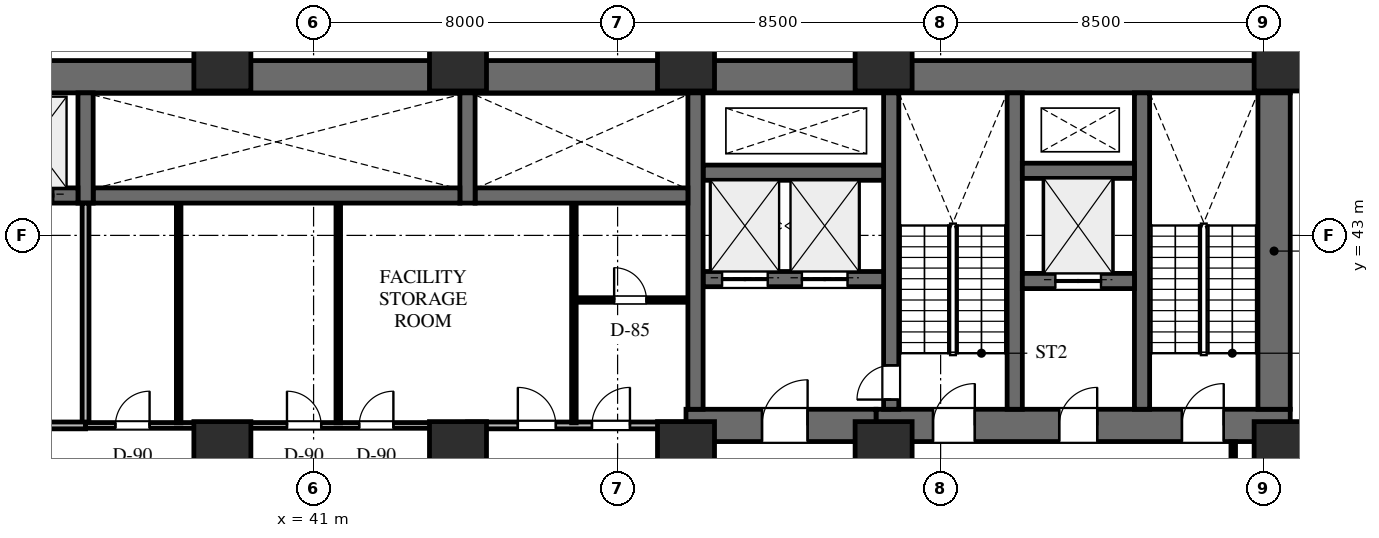
"""IFC4 building model, lengths in metres.
Left out: names, types, materials, properties, quantities, classifications, styles, units other than length and angle.
Written with IfcOpenShell. Run it as: python <this file> out.ifc"""

import sys

from ifc_helpers import new_model, si_unit, direction, frame, frame_2d, origin, origin_2d, place, context, subcontext, project, spatial, rectangle, extrude, element, fill, save


model = new_model("IFC4")
c1 = context("Model", 3, precision=1e-05, world=origin(), true_north=direction((0.0, 1.0)))
c2 = subcontext(c1, "Body", "Model", "MODEL_VIEW")
j1 = project(units=[si_unit("LENGTHUNIT", "METRE"), si_unit("PLANEANGLEUNIT", "RADIAN")], contexts=[c1])
p1 = place(None, origin())
s1 = spatial("IfcSite", under=j1, at=p1, CompositionType="ELEMENT")
p2 = place(p1, origin())
s2 = spatial("IfcBuilding", under=s1, at=p2, CompositionType="ELEMENT")
p3 = place(p2, frame((0.0, 0.0, 19.8)))
s3 = spatial("IfcBuildingStorey", under=s2, at=p3, CompositionType="ELEMENT", Elevation=19.8)
p4 = place(p3, frame((22.9, 47.175, 0.0), z_axis=(0.0, 0.0, 1.0), x_axis=(1.0, 0.0, 0.0)))
e1 = element("IfcWall", 1, at=p4, inside=s3, PredefinedType="SHEAR", context=c2, shape_type="SweptSolid", body=[
    extrude(rectangle(XDim=43.8, YDim=0.85, at=frame_2d((21.9, 0.0))), origin(), (0.0, 0.0, 1.0), 4.5),
])
p5 = place(p3, frame((55.8, 38.0, 0.0), z_axis=(0.0, 0.0, 1.0), x_axis=(1.0, 0.0, 0.0)))
e2 = element("IfcWall", 2, at=p5, inside=s3, PredefinedType="SHEAR", context=c2, shape_type="SweptSolid", body=[
    extrude(rectangle(XDim=10.9, YDim=0.85, at=frame_2d((5.45, 0.0))), origin(), (0.0, 0.0, 1.0), 4.5),
])
p6 = place(p5, frame((1.5, 0.0, 0.0)))
e3 = element("IfcOpeningElement", 3, at=p6, cuts=e2, PredefinedType="OPENING", context=c2, shape_type="SweptSolid", body=[
    extrude(rectangle(XDim=1.1, YDim=2.2, at=frame_2d((0.55, 1.1))), frame((0.0, 0.435, 0.0), z_axis=(0.0, -1.0, 0.0), x_axis=(1.0, 0.0, 0.0)), (0.0, 0.0, 1.0), 0.87),
])
p7 = place(p5, frame((4.82, 0.0, 0.0)))
e4 = element("IfcOpeningElement", 4, at=p7, cuts=e2, PredefinedType="OPENING", context=c2, shape_type="SweptSolid", body=[
    extrude(rectangle(XDim=1.0, YDim=2.15, at=frame_2d((0.5, 1.075))), frame((0.0, 0.435, 0.0), z_axis=(0.0, -1.0, 0.0), x_axis=(1.0, 0.0, 0.0)), (0.0, 0.0, 1.0), 0.87),
])
p8 = place(p5, frame((8.05, 0.0, 0.0)))
e5 = element("IfcOpeningElement", 5, at=p8, cuts=e2, PredefinedType="OPENING", context=c2, shape_type="SweptSolid", body=[
    extrude(rectangle(XDim=1.1, YDim=2.2, at=frame_2d((0.55, 1.1))), frame((0.0, 0.435, 0.0), z_axis=(0.0, -1.0, 0.0), x_axis=(1.0, 0.0, 0.0)), (0.0, 0.0, 1.0), 0.87),
])
p9 = place(p3, frame((66.275, 38.425, 0.0), z_axis=(0.0, 0.0, 1.0), x_axis=(0.0, 1.0, 0.0)))
e6 = element("IfcWall", 6, at=p9, inside=s3, PredefinedType="SHEAR", context=c2, shape_type="SweptSolid", body=[
    extrude(rectangle(XDim=8.325, YDim=0.85, at=frame_2d((4.163, 0.0))), origin(), (0.0, 0.0, 1.0), 4.5),
])
for number, where, z_axis, x_axis in (
    (7, (62.8, 38.425, 0.0), (0.0, 0.0, 1.0), (0.0, 1.0, 0.0)),
    (8, (59.45, 38.425, 0.0), (0.0, 0.0, 1.0), (0.0, 1.0, 0.0)),
):
    element("IfcWall", number, at=place(p3, frame(where, z_axis=z_axis, x_axis=x_axis)), inside=s3, PredefinedType="SHEAR", context=c2, shape_type="SweptSolid", body=[
        extrude(rectangle(XDim=8.325, YDim=0.4, at=frame_2d((4.163, 0.0))), origin(), (0.0, 0.0, 1.0), 4.5),
    ])
p10 = place(p3, frame((56.2, 38.425, 0.0), z_axis=(0.0, 0.0, 1.0), x_axis=(0.0, 1.0, 0.0)))
e9 = element("IfcWall", 9, at=p10, inside=s3, PredefinedType="SHEAR", context=c2, shape_type="SweptSolid", body=[
    extrude(rectangle(XDim=8.325, YDim=0.4, at=frame_2d((4.163, 0.0))), origin(), (0.0, 0.0, 1.0), 4.5),
])
p11 = place(p10, frame((0.255, 0.0, 0.0)))
e10 = element("IfcOpeningElement", 10, at=p11, cuts=e9, PredefinedType="OPENING", context=c2, shape_type="SweptSolid", body=[
    extrude(rectangle(XDim=0.9, YDim=2.15, at=frame_2d((0.45, 1.075))), frame((0.0, 0.21, 0.0), z_axis=(0.0, -1.0, 0.0), x_axis=(1.0, 0.0, 0.0)), (0.0, 0.0, 1.0), 0.42),
])
p12 = place(p3, frame((59.65, 41.8, 0.0), z_axis=(0.0, 0.0, 1.0), x_axis=(1.0, 0.0, 0.0)))
e11 = element("IfcWall", 11, at=p12, inside=s3, PredefinedType="SHEAR", context=c2, shape_type="SweptSolid", body=[
    extrude(rectangle(XDim=2.95, YDim=0.4, at=frame_2d((1.475, 0.0))), origin(), (0.0, 0.0, 1.0), 4.5),
])
p13 = place(p12, frame((0.87, 0.0, 0.0)))
e12 = element("IfcOpeningElement", 12, at=p13, cuts=e11, PredefinedType="OPENING", context=c2, shape_type="SweptSolid", body=[
    extrude(rectangle(XDim=1.2, YDim=2.2, at=frame_2d((0.6, 1.1))), frame((0.0, 0.21, 0.0), z_axis=(0.0, -1.0, 0.0), x_axis=(1.0, 0.0, 0.0)), (0.0, 0.0, 1.0), 0.42),
])
p14 = place(p3, frame((59.65, 44.7, 0.0), z_axis=(0.0, 0.0, 1.0), x_axis=(1.0, 0.0, 0.0)))
e13 = element("IfcWall", 13, at=p14, inside=s3, PredefinedType="SHEAR", context=c2, shape_type="SweptSolid", body=[
    extrude(rectangle(XDim=2.95, YDim=0.4, at=frame_2d((1.475, 0.0))), origin(), (0.0, 0.0, 1.0), 4.5),
])
p15 = place(p3, frame((50.8, 38.0, 0.0), z_axis=(0.0, 0.0, 1.0), x_axis=(1.0, 0.0, 0.0)))
e14 = element("IfcWall", 14, at=p15, inside=s3, PredefinedType="SHEAR", context=c2, shape_type="SweptSolid", body=[
    extrude(rectangle(XDim=5.0, YDim=0.85, at=frame_2d((2.5, 0.0))), origin(), (0.0, 0.0, 1.0), 4.5),
])
p16 = place(p15, frame((2.0, 0.0, 0.0)))
e15 = element("IfcOpeningElement", 15, at=p16, cuts=e14, PredefinedType="OPENING", context=c2, shape_type="SweptSolid", body=[
    extrude(rectangle(XDim=1.2, YDim=2.2, at=frame_2d((0.6, 1.1))), frame((0.0, 0.435, 0.0), z_axis=(0.0, -1.0, 0.0), x_axis=(1.0, 0.0, 0.0)), (0.0, 0.0, 1.0), 0.87),
])
p17 = place(p3, frame((51.25, 41.85, 0.0), z_axis=(0.0, 0.0, 1.0), x_axis=(1.0, 0.0, 0.0)))
e16 = element("IfcWall", 16, at=p17, inside=s3, PredefinedType="SHEAR", context=c2, shape_type="SweptSolid", body=[
    extrude(rectangle(XDim=4.75, YDim=0.4, at=frame_2d((2.375, 0.0))), origin(), (0.0, 0.0, 1.0), 4.5),
])
p18 = place(p17, frame((0.5, 0.0, 0.0)))
e17 = element("IfcOpeningElement", 17, at=p18, cuts=e16, PredefinedType="OPENING", context=c2, shape_type="SweptSolid", body=[
    extrude(rectangle(XDim=1.2, YDim=2.2, at=frame_2d((0.6, 1.1))), frame((0.0, 0.21, 0.0), z_axis=(0.0, -1.0, 0.0), x_axis=(1.0, 0.0, 0.0)), (0.0, 0.0, 1.0), 0.42),
])
p19 = place(p17, frame((2.6, 0.0, 0.0)))
e18 = element("IfcOpeningElement", 18, at=p19, cuts=e16, PredefinedType="OPENING", context=c2, shape_type="SweptSolid", body=[
    extrude(rectangle(XDim=1.2, YDim=2.2, at=frame_2d((0.6, 1.1))), frame((0.0, 0.21, 0.0), z_axis=(0.0, -1.0, 0.0), x_axis=(1.0, 0.0, 0.0)), (0.0, 0.0, 1.0), 0.42),
])
p20 = place(p3, frame((51.25, 44.65, 0.0), z_axis=(0.0, 0.0, 1.0), x_axis=(1.0, 0.0, 0.0)))
e19 = element("IfcWall", 19, at=p20, inside=s3, PredefinedType="SHEAR", context=c2, shape_type="SweptSolid", body=[
    extrude(rectangle(XDim=4.75, YDim=0.4, at=frame_2d((2.375, 0.0))), origin(), (0.0, 0.0, 1.0), 4.5),
])
p21 = place(p3, frame((51.05, 38.425, 0.0), z_axis=(0.0, 0.0, 1.0), x_axis=(0.0, 1.0, 0.0)))
e20 = element("IfcWall", 20, at=p21, inside=s3, PredefinedType="SHEAR", context=c2, shape_type="SweptSolid", body=[
    extrude(rectangle(XDim=8.325, YDim=0.4, at=frame_2d((4.163, 0.0))), origin(), (0.0, 0.0, 1.0), 4.5),
])
p22 = place(p3, frame((45.25, 44.05, 0.0), z_axis=(0.0, 0.0, 1.0), x_axis=(1.0, 0.0, 0.0)))
e21 = element("IfcWall", 21, at=p22, inside=s3, PredefinedType="SHEAR", context=c2, shape_type="SweptSolid", body=[
    extrude(rectangle(XDim=5.6, YDim=0.4, at=frame_2d((2.8, 0.0))), origin(), (0.0, 0.0, 1.0), 4.5),
])
p23 = place(p3, frame((45.05, 43.85, 0.0), z_axis=(0.0, 0.0, 1.0), x_axis=(0.0, 1.0, 0.0)))
e22 = element("IfcWall", 22, at=p23, inside=s3, PredefinedType="SHEAR", context=c2, shape_type="SweptSolid", body=[
    extrude(rectangle(XDim=2.9, YDim=0.4, at=frame_2d((1.45, 0.0))), origin(), (0.0, 0.0, 1.0), 4.5),
])
p24 = place(p3, frame((35.2, 44.05, 0.0), z_axis=(0.0, 0.0, 1.0), x_axis=(1.0, 0.0, 0.0)))
e23 = element("IfcWall", 23, at=p24, inside=s3, PredefinedType="SHEAR", context=c2, shape_type="SweptSolid", body=[
    extrude(rectangle(XDim=9.65, YDim=0.4, at=frame_2d((4.825, 0.0))), origin(), (0.0, 0.0, 1.0), 4.5),
])
p25 = place(p3, frame((35.0, 43.85, 0.0), z_axis=(0.0, 0.0, 1.0), x_axis=(0.0, 1.0, 0.0)))
e24 = element("IfcWall", 24, at=p25, inside=s3, PredefinedType="SHEAR", context=c2, shape_type="SweptSolid", body=[
    extrude(rectangle(XDim=2.9, YDim=0.4, at=frame_2d((1.45, 0.0))), origin(), (0.0, 0.0, 1.0), 4.5),
])
p26 = place(p3, frame((26.85, 44.05, 0.0), z_axis=(0.0, 0.0, 1.0), x_axis=(1.0, 0.0, 0.0)))
e25 = element("IfcWall", 25, at=p26, inside=s3, PredefinedType="SHEAR", context=c2, shape_type="SweptSolid", body=[
    extrude(rectangle(XDim=7.95, YDim=0.4, at=frame_2d((3.975, 0.0))), origin(), (0.0, 0.0, 1.0), 4.5),
])
p27 = place(p26, frame((0.2, 0.0, 0.0)))
e26 = element("IfcOpeningElement", 26, at=p27, cuts=e25, PredefinedType="OPENING", context=c2, shape_type="SweptSolid", body=[
    extrude(rectangle(XDim=1.1, YDim=2.2, at=frame_2d((0.55, 1.1))), frame((0.0, 0.21, 0.0), z_axis=(0.0, -1.0, 0.0), x_axis=(1.0, 0.0, 0.0)), (0.0, 0.0, 1.0), 0.42),
])
p28 = place(p26, frame((2.2, 0.0, 0.0)))
e27 = element("IfcOpeningElement", 27, at=p28, cuts=e25, PredefinedType="OPENING", context=c2, shape_type="SweptSolid", body=[
    extrude(rectangle(XDim=1.1, YDim=2.2, at=frame_2d((0.55, 1.1))), frame((0.0, 0.21, 0.0), z_axis=(0.0, -1.0, 0.0), x_axis=(1.0, 0.0, 0.0)), (0.0, 0.0, 1.0), 0.42),
])
p29 = place(p26, frame((4.2, 0.0, 0.0)))
e28 = element("IfcOpeningElement", 28, at=p29, cuts=e25, PredefinedType="OPENING", context=c2, shape_type="SweptSolid", body=[
    extrude(rectangle(XDim=1.1, YDim=2.2, at=frame_2d((0.55, 1.1))), frame((0.0, 0.21, 0.0), z_axis=(0.0, -1.0, 0.0), x_axis=(1.0, 0.0, 0.0)), (0.0, 0.0, 1.0), 0.42),
])
p30 = place(p26, frame((6.2, 0.0, 0.0)))
e29 = element("IfcOpeningElement", 29, at=p30, cuts=e25, PredefinedType="OPENING", context=c2, shape_type="SweptSolid", body=[
    extrude(rectangle(XDim=1.1, YDim=2.2, at=frame_2d((0.55, 1.1))), frame((0.0, 0.21, 0.0), z_axis=(0.0, -1.0, 0.0), x_axis=(1.0, 0.0, 0.0)), (0.0, 0.0, 1.0), 0.42),
])
for number, where, z_axis, x_axis in (
    (30, (66.5, 47.55, 0.0), (0.0, 0.0, 1.0), (1.0, 0.0, 0.0)),
    (31, (56.0, 47.55, 0.0), (0.0, 0.0, 1.0), (1.0, 0.0, 0.0)),
    (32, (66.5, 37.35, 0.0), (0.0, 0.0, 1.0), (1.0, 0.0, 0.0)),
    (33, (56.0, 37.35, 0.0), (0.0, 0.0, 1.0), (1.0, 0.0, 0.0)),
    (34, (50.8, 47.55, 0.0), (0.0, 0.0, 1.0), (1.0, 0.0, 0.0)),
    (35, (50.8, 37.35, 0.0), (0.0, 0.0, 1.0), (1.0, 0.0, 0.0)),
    (36, (44.8, 37.35, 0.0), (0.0, 0.0, 1.0), (1.0, 0.0, 0.0)),
    (37, (44.8, 47.55, 0.0), (0.0, 0.0, 1.0), (1.0, 0.0, 0.0)),
    (38, (38.6, 37.35, 0.0), (0.0, 0.0, 1.0), (1.0, 0.0, 0.0)),
    (39, (38.6, 47.55, 0.0), (0.0, 0.0, 1.0), (1.0, 0.0, 0.0)),
):
    element("IfcColumn", number, at=place(p3, frame(where, z_axis=z_axis, x_axis=x_axis)), inside=s3, PredefinedType="COLUMN", context=c2, shape_type="SweptSolid", body=[
        extrude(rectangle(XDim=1.5, YDim=1.5, at=origin_2d()), origin(), (0.0, 0.0, 1.0), 4.5),
    ])
p31 = place(p3, frame((45.05, 38.0, 0.0), z_axis=(0.0, 0.0, 1.0), x_axis=(1.0, 0.0, 0.0)))
e40 = element("IfcWall", 40, at=p31, inside=s3, PredefinedType="STANDARD", context=c2, shape_type="SweptSolid", body=[
    extrude(rectangle(XDim=5.75, YDim=0.18, at=frame_2d((2.875, 0.0))), origin(), (0.0, 0.0, 1.0), 3.202),
])
p32 = place(p31, frame((1.325, 0.0, 0.0)))
e41 = element("IfcOpeningElement", 41, at=p32, cuts=e40, PredefinedType="OPENING", context=c2, shape_type="SweptSolid", body=[
    extrude(rectangle(XDim=1.0, YDim=2.15, at=frame_2d((0.5, 1.075))), frame((0.0, 0.1, 0.0), z_axis=(0.0, -1.0, 0.0), x_axis=(1.0, 0.0, 0.0)), (0.0, 0.0, 1.0), 0.2),
])
p33 = place(p31, frame((3.275, 0.0, 0.0)))
e42 = element("IfcOpeningElement", 42, at=p33, cuts=e40, PredefinedType="OPENING", context=c2, shape_type="SweptSolid", body=[
    extrude(rectangle(XDim=1.0, YDim=2.15, at=frame_2d((0.5, 1.075))), frame((0.0, 0.1, 0.0), z_axis=(0.0, -1.0, 0.0), x_axis=(1.0, 0.0, 0.0)), (0.0, 0.0, 1.0), 0.2),
])
p34 = place(p3, frame((47.85, 38.068, 0.0), z_axis=(0.0, 0.0, 1.0), x_axis=(0.0, 1.0, 0.0)))
e43 = element("IfcWall", 43, at=p34, inside=s3, PredefinedType="PARTITIONING", context=c2, shape_type="SweptSolid", body=[
    extrude(rectangle(XDim=5.774, YDim=0.12, at=frame_2d((2.887, 0.0))), origin(), (0.0, 0.0, 1.0), 4.15),
])
p35 = place(p3, frame((47.918, 41.3, 0.0), z_axis=(0.0, 0.0, 1.0), x_axis=(1.0, 0.0, 0.0)))
e44 = element("IfcWall", 44, at=p35, inside=s3, PredefinedType="PARTITIONING", context=c2, shape_type="SweptSolid", body=[
    extrude(rectangle(XDim=2.924, YDim=0.12, at=frame_2d((1.462, 0.0))), origin(), (0.0, 0.0, 1.0), 3.202),
])
p36 = place(p35, frame((0.991, 0.0, 0.0)))
e45 = element("IfcOpeningElement", 45, at=p36, cuts=e44, PredefinedType="OPENING", context=c2, shape_type="SweptSolid", body=[
    extrude(rectangle(XDim=0.85, YDim=2.1, at=frame_2d((0.425, 1.05))), frame((0.0, 0.07, 0.0), z_axis=(0.0, -1.0, 0.0), x_axis=(1.0, 0.0, 0.0)), (0.0, 0.0, 1.0), 0.14),
])
p37 = place(p3, frame((35.0, 38.0, 0.0), z_axis=(0.0, 0.0, 1.0), x_axis=(0.0, 1.0, 0.0)))
e46 = element("IfcWall", 46, at=p37, inside=s3, PredefinedType="STANDARD", context=c2, shape_type="SweptSolid", body=[
    extrude(rectangle(XDim=5.85, YDim=0.18, at=frame_2d((2.925, 0.0))), origin(), (0.0, 0.0, 1.0), 4.15),
])
p38 = place(p3, frame((27.05, 38.0, 0.0), z_axis=(0.0, 0.0, 1.0), x_axis=(1.0, 0.0, 0.0)))
e47 = element("IfcWall", 47, at=p38, inside=s3, PredefinedType="STANDARD", context=c2, shape_type="SweptSolid", body=[
    extrude(rectangle(XDim=7.95, YDim=0.18, at=frame_2d((3.975, 0.0))), origin(), (0.0, 0.0, 1.0), 3.202),
])
p39 = place(p38, frame((2.25, 0.0, 0.0)))
e48 = element("IfcOpeningElement", 48, at=p39, cuts=e47, PredefinedType="OPENING", context=c2, shape_type="SweptSolid", body=[
    extrude(rectangle(XDim=1.8, YDim=2.2, at=frame_2d((0.9, 1.1))), frame((0.0, 0.1, 0.0), z_axis=(0.0, -1.0, 0.0), x_axis=(1.0, 0.0, 0.0)), (0.0, 0.0, 1.0), 0.2),
])
p40 = place(p3, frame((35.0, 38.0, 0.0), z_axis=(0.0, 0.0, 1.0), x_axis=(1.0, 0.0, 0.0)))
e49 = element("IfcWall", 49, at=p40, inside=s3, PredefinedType="PARTITIONING", context=c2, shape_type="SweptSolid", body=[
    extrude(rectangle(XDim=10.05, YDim=0.15, at=frame_2d((5.025, 0.0))), origin(), (0.0, 0.0, 1.0), 3.202),
])
p41 = place(p40, frame((0.785, 0.0, 0.0)))
e50 = element("IfcOpeningElement", 50, at=p41, cuts=e49, PredefinedType="OPENING", context=c2, shape_type="SweptSolid", body=[
    extrude(rectangle(XDim=0.9, YDim=2.1, at=frame_2d((0.45, 1.05))), frame((0.0, 0.085, 0.0), z_axis=(0.0, -1.0, 0.0), x_axis=(1.0, 0.0, 0.0)), (0.0, 0.0, 1.0), 0.17),
])
p42 = place(p40, frame((5.3, 0.0, 0.0)))
e51 = element("IfcOpeningElement", 51, at=p42, cuts=e49, PredefinedType="OPENING", context=c2, shape_type="SweptSolid", body=[
    extrude(rectangle(XDim=0.9, YDim=2.1, at=frame_2d((0.45, 1.05))), frame((0.0, 0.085, 0.0), z_axis=(0.0, -1.0, 0.0), x_axis=(1.0, 0.0, 0.0)), (0.0, 0.0, 1.0), 0.17),
])
p43 = place(p40, frame((7.2, 0.0, 0.0)))
e52 = element("IfcOpeningElement", 52, at=p43, cuts=e49, PredefinedType="OPENING", context=c2, shape_type="SweptSolid", body=[
    extrude(rectangle(XDim=0.9, YDim=2.1, at=frame_2d((0.45, 1.05))), frame((0.0, 0.085, 0.0), z_axis=(0.0, -1.0, 0.0), x_axis=(1.0, 0.0, 0.0)), (0.0, 0.0, 1.0), 0.17),
])
for number, where, z_axis, x_axis in (
    (53, (37.45, 38.068, 0.0), (0.0, 0.0, 1.0), (0.0, 1.0, 0.0)),
    (54, (41.65, 38.068, 0.0), (0.0, 0.0, 1.0), (0.0, 1.0, 0.0)),
):
    element("IfcWall", number, at=place(p3, frame(where, z_axis=z_axis, x_axis=x_axis)), inside=s3, PredefinedType="PARTITIONING", context=c2, shape_type="SweptSolid", body=[
        extrude(rectangle(XDim=5.774, YDim=0.12, at=frame_2d((2.887, 0.0))), origin(), (0.0, 0.0, 1.0), 4.15),
    ])
p44 = place(p3, frame((65.2, 34.4, 0.0), z_axis=(0.0, 0.0, 1.0), x_axis=(0.0, 1.0, 0.0)))
e55 = element("IfcWall", 55, at=p44, inside=s3, PredefinedType="PARTITIONING", context=c2, shape_type="SweptSolid", body=[
    extrude(rectangle(XDim=3.167, YDim=0.12, at=frame_2d((1.583, 0.0))), origin(), (0.0, 0.0, 1.0), 3.202),
])
p45 = place(p6, origin())
e56 = element("IfcDoor", 56, at=p45, inside=s3, OperationType="SINGLE_SWING_RIGHT", PredefinedType="DOOR", context=c2, shape_type="SweptSolid", body=[
    extrude(rectangle(XDim=1.1, YDim=2.2, at=frame_2d((0.55, 1.1))), frame((0.0, 0.025, 0.0), z_axis=(0.0, -1.0, 0.0), x_axis=(1.0, 0.0, 0.0)), (0.0, 0.0, 1.0), 0.05),
])
fill(e3, e56)
p46 = place(p7, origin())
e57 = element("IfcDoor", 57, at=p46, inside=s3, OperationType="SINGLE_SWING_RIGHT", PredefinedType="DOOR", context=c2, shape_type="SweptSolid", body=[
    extrude(rectangle(XDim=1.0, YDim=2.15, at=frame_2d((0.5, 1.075))), frame((0.0, 0.025, 0.0), z_axis=(0.0, -1.0, 0.0), x_axis=(1.0, 0.0, 0.0)), (0.0, 0.0, 1.0), 0.05),
])
fill(e4, e57)
p47 = place(p8, origin())
e58 = element("IfcDoor", 58, at=p47, inside=s3, OperationType="SINGLE_SWING_RIGHT", PredefinedType="DOOR", context=c2, shape_type="SweptSolid", body=[
    extrude(rectangle(XDim=1.1, YDim=2.2, at=frame_2d((0.55, 1.1))), frame((0.0, 0.025, 0.0), z_axis=(0.0, -1.0, 0.0), x_axis=(1.0, 0.0, 0.0)), (0.0, 0.0, 1.0), 0.05),
])
fill(e5, e58)
p48 = place(p16, origin())
e59 = element("IfcDoor", 59, at=p48, inside=s3, OperationType="SINGLE_SWING_RIGHT", PredefinedType="DOOR", context=c2, shape_type="SweptSolid", body=[
    extrude(rectangle(XDim=1.2, YDim=2.2, at=frame_2d((0.6, 1.1))), frame((0.0, 0.025, 0.0), z_axis=(0.0, -1.0, 0.0), x_axis=(1.0, 0.0, 0.0)), (0.0, 0.0, 1.0), 0.05),
])
fill(e15, e59)
p49 = place(p11, origin())
e60 = element("IfcDoor", 60, at=p49, inside=s3, OperationType="SINGLE_SWING_LEFT", PredefinedType="DOOR", context=c2, shape_type="SweptSolid", body=[
    extrude(rectangle(XDim=0.9, YDim=2.15, at=frame_2d((0.45, 1.075))), frame((0.0, 0.025, 0.0), z_axis=(0.0, -1.0, 0.0), x_axis=(1.0, 0.0, 0.0)), (0.0, 0.0, 1.0), 0.05),
])
fill(e10, e60)
p50 = place(p30, origin())
e61 = element("IfcDoor", 61, at=p50, inside=s3, OperationType="DOUBLE_DOOR_SLIDING", PredefinedType="DOOR", context=c2, shape_type="SweptSolid", body=[
    extrude(rectangle(XDim=1.1, YDim=2.2, at=frame_2d((0.55, 1.1))), frame((0.0, 0.025, 0.0), z_axis=(0.0, -1.0, 0.0), x_axis=(1.0, 0.0, 0.0)), (0.0, 0.0, 1.0), 0.05),
])
fill(e29, e61)
p51 = place(p18, origin())
e62 = element("IfcDoor", 62, at=p51, inside=s3, OperationType="DOUBLE_DOOR_SLIDING", PredefinedType="DOOR", context=c2, shape_type="SweptSolid", body=[
    extrude(rectangle(XDim=1.2, YDim=2.2, at=frame_2d((0.6, 1.1))), frame((0.0, 0.025, 0.0), z_axis=(0.0, -1.0, 0.0), x_axis=(1.0, 0.0, 0.0)), (0.0, 0.0, 1.0), 0.05),
])
fill(e17, e62)
p52 = place(p19, origin())
e63 = element("IfcDoor", 63, at=p52, inside=s3, OperationType="DOUBLE_DOOR_SLIDING", PredefinedType="DOOR", context=c2, shape_type="SweptSolid", body=[
    extrude(rectangle(XDim=1.2, YDim=2.2, at=frame_2d((0.6, 1.1))), frame((0.0, 0.025, 0.0), z_axis=(0.0, -1.0, 0.0), x_axis=(1.0, 0.0, 0.0)), (0.0, 0.0, 1.0), 0.05),
])
fill(e18, e63)
p53 = place(p13, origin())
e64 = element("IfcDoor", 64, at=p53, inside=s3, OperationType="DOUBLE_DOOR_SLIDING", PredefinedType="DOOR", context=c2, shape_type="SweptSolid", body=[
    extrude(rectangle(XDim=1.2, YDim=2.2, at=frame_2d((0.6, 1.1))), frame((0.0, 0.025, 0.0), z_axis=(0.0, -1.0, 0.0), x_axis=(1.0, 0.0, 0.0)), (0.0, 0.0, 1.0), 0.05),
])
fill(e12, e64)
p54 = place(p32, origin())
e65 = element("IfcDoor", 65, at=p54, inside=s3, OperationType="SINGLE_SWING_LEFT", PredefinedType="DOOR", context=c2, shape_type="SweptSolid", body=[
    extrude(rectangle(XDim=1.0, YDim=2.15, at=frame_2d((0.5, 1.075))), frame((0.0, 0.025, 0.0), z_axis=(0.0, -1.0, 0.0), x_axis=(1.0, 0.0, 0.0)), (0.0, 0.0, 1.0), 0.05),
])
fill(e41, e65)
p55 = place(p33, origin())
e66 = element("IfcDoor", 66, at=p55, inside=s3, OperationType="SINGLE_SWING_RIGHT", PredefinedType="DOOR", context=c2, shape_type="SweptSolid", body=[
    extrude(rectangle(XDim=1.0, YDim=2.15, at=frame_2d((0.5, 1.075))), frame((0.0, 0.025, 0.0), z_axis=(0.0, -1.0, 0.0), x_axis=(1.0, 0.0, 0.0)), (0.0, 0.0, 1.0), 0.05),
])
fill(e42, e66)
p56 = place(p36, origin())
e67 = element("IfcDoor", 67, at=p56, inside=s3, OperationType="SINGLE_SWING_LEFT", PredefinedType="DOOR", context=c2, shape_type="SweptSolid", body=[
    extrude(rectangle(XDim=0.85, YDim=2.1, at=frame_2d((0.425, 1.05))), frame((0.0, 0.025, 0.0), z_axis=(0.0, -1.0, 0.0), x_axis=(1.0, 0.0, 0.0)), (0.0, 0.0, 1.0), 0.05),
])
fill(e45, e67)
p57 = place(p41, origin())
e68 = element("IfcDoor", 68, at=p57, inside=s3, OperationType="SINGLE_SWING_RIGHT", PredefinedType="DOOR", context=c2, shape_type="SweptSolid", body=[
    extrude(rectangle(XDim=0.9, YDim=2.1, at=frame_2d((0.45, 1.05))), frame((0.0, 0.025, 0.0), z_axis=(0.0, -1.0, 0.0), x_axis=(1.0, 0.0, 0.0)), (0.0, 0.0, 1.0), 0.05),
])
fill(e50, e68)
p58 = place(p42, origin())
e69 = element("IfcDoor", 69, at=p58, inside=s3, OperationType="SINGLE_SWING_LEFT", PredefinedType="DOOR", context=c2, shape_type="SweptSolid", body=[
    extrude(rectangle(XDim=0.9, YDim=2.1, at=frame_2d((0.45, 1.05))), frame((0.0, 0.025, 0.0), z_axis=(0.0, -1.0, 0.0), x_axis=(1.0, 0.0, 0.0)), (0.0, 0.0, 1.0), 0.05),
])
fill(e51, e69)
p59 = place(p43, origin())
e70 = element("IfcDoor", 70, at=p59, inside=s3, OperationType="SINGLE_SWING_RIGHT", PredefinedType="DOOR", context=c2, shape_type="SweptSolid", body=[
    extrude(rectangle(XDim=0.9, YDim=2.1, at=frame_2d((0.45, 1.05))), frame((0.0, 0.025, 0.0), z_axis=(0.0, -1.0, 0.0), x_axis=(1.0, 0.0, 0.0)), (0.0, 0.0, 1.0), 0.05),
])
fill(e52, e70)
save(model, sys.argv[1])
